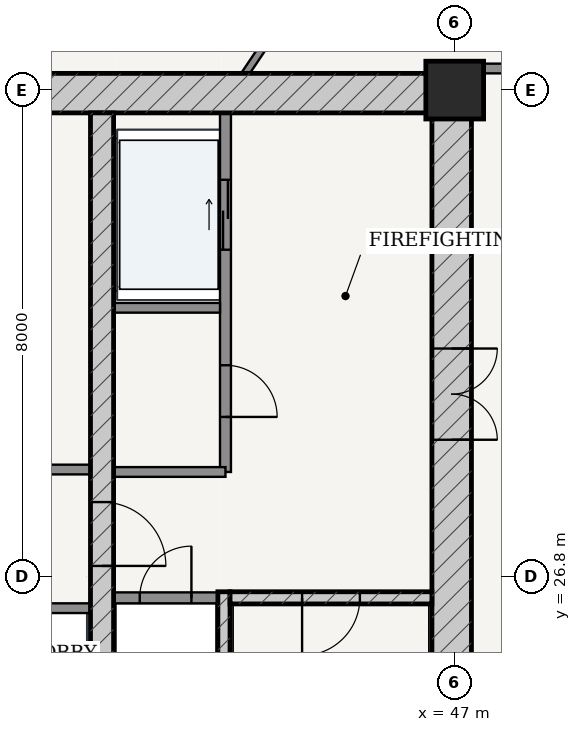
"""IFC4 building model, lengths in metres.
Left out: names, types, materials, properties, quantities, classifications, styles, units other than length and angle.
Written with IfcOpenShell. Run it as: python <this file> out.ifc"""

import sys

from ifc_helpers import new_model, si_unit, direction, frame, frame_2d, origin, origin_2d, place, context, subcontext, project, spatial, rectangle, extrude, source, transform, mapped, element, fill, save


model = new_model("IFC4")
c1 = context("Model", 3, precision=1e-05, world=origin(), true_north=direction((-0.2419218956, 0.970295726276)))
c2 = subcontext(c1, "Body", "Model", "MODEL_VIEW")
j1 = project(units=[si_unit("LENGTHUNIT", "METRE"), si_unit("PLANEANGLEUNIT", "RADIAN")], contexts=[c1])
p1 = place(None, origin())
s1 = spatial("IfcSite", under=j1, at=p1, CompositionType="ELEMENT")
p2 = place(p1, origin())
s2 = spatial("IfcBuilding", under=s1, at=p2, CompositionType="ELEMENT")
p3 = place(p2, frame((0.0, 0.0, 175.0)))
s3 = spatial("IfcBuildingStorey", under=s2, at=p3, CompositionType="ELEMENT", Elevation=175.0)
p4 = place(p3, frame((47.0, 34.8, 0.0), z_axis=(0.0, 0.0, 1.0), x_axis=(1.0, 0.0, 0.0)))
e1 = element("IfcColumn", 1, at=p4, inside=s3, PredefinedType="COLUMN", context=c2, shape_type="SweptSolid", body=[
    extrude(rectangle(XDim=0.95, YDim=0.95, at=origin_2d()), origin(), (0.0, 0.0, 1.0), 3.6),
])
p5 = place(p3, frame((28.725, 34.75, 0.0), z_axis=(0.0, 0.0, 1.0), x_axis=(1.0, 0.0, 0.0)))
e2 = element("IfcWall", 2, at=p5, inside=s3, PredefinedType="SHEAR", context=c2, shape_type="SweptSolid", body=[
    extrude(rectangle(XDim=18.55, YDim=0.65, at=frame_2d((9.275, 0.0))), origin(), (0.0, 0.0, 1.0), 3.33),
])
p6 = place(p3, frame((46.95, 19.175, 0.0), z_axis=(0.0, 0.0, 1.0), x_axis=(0.0, 1.0, 0.0)))
e3 = element("IfcWall", 3, at=p6, inside=s3, PredefinedType="SHEAR", context=c2, shape_type="SweptSolid", body=[
    extrude(rectangle(XDim=15.25, YDim=0.65, at=frame_2d((7.625, 0.0))), origin(), (0.0, 0.0, 1.0), 3.33),
])
p7 = place(p6, frame((9.875, 0.0, 0.0)))
e4 = element("IfcOpeningElement", 4, at=p7, cuts=e3, PredefinedType="OPENING", context=c2, shape_type="SweptSolid", body=[
    extrude(rectangle(XDim=1.5, YDim=2.2, at=frame_2d((0.75, 1.1))), frame((0.0, 0.335, 0.0), z_axis=(0.0, -1.0, 0.0), x_axis=(1.0, 0.0, 0.0)), (0.0, 0.0, 1.0), 0.67),
])
p8 = place(p3, frame((43.205, 19.175, 0.0), z_axis=(0.0, 0.0, 1.0), x_axis=(0.0, 1.0, 0.0)))
e5 = element("IfcWall", 5, at=p8, inside=s3, PredefinedType="SOLIDWALL", context=c2, shape_type="SweptSolid", body=[
    extrude(rectangle(XDim=7.375, YDim=0.2, at=frame_2d((3.688, 0.0))), origin(), (0.0, 0.0, 1.0), 3.33),
])
p9 = place(p3, frame((43.305, 26.45, 0.0), z_axis=(0.0, 0.0, 1.0), x_axis=(1.0, 0.0, 0.0)))
e6 = element("IfcWall", 6, at=p9, inside=s3, PredefinedType="SOLIDWALL", context=c2, shape_type="SweptSolid", body=[
    extrude(rectangle(XDim=3.32, YDim=0.2, at=frame_2d((1.66, 0.0))), origin(), (0.0, 0.0, 1.0), 3.33),
])
p10 = place(p9, frame((1.185, 0.0, 0.0)))
e7 = element("IfcOpeningElement", 7, at=p10, cuts=e6, PredefinedType="OPENING", context=c2, shape_type="SweptSolid", body=[
    extrude(rectangle(XDim=0.95, YDim=2.15, at=frame_2d((0.475, 1.075))), frame((0.0, 0.11, 0.0), z_axis=(0.0, -1.0, 0.0), x_axis=(1.0, 0.0, 0.0)), (0.0, 0.0, 1.0), 0.22),
])
p11 = place(p3, frame((41.2, 19.175, 0.0), z_axis=(0.0, 0.0, 1.0), x_axis=(0.0, 1.0, 0.0)))
e8 = element("IfcWall", 8, at=p11, inside=s3, PredefinedType="SHEAR", context=c2, shape_type="SweptSolid", body=[
    extrude(rectangle(XDim=15.25, YDim=0.38, at=frame_2d((7.625, 0.0))), origin(), (0.0, 0.0, 1.0), 3.33),
])
p12 = place(p11, frame((7.8, 0.0, 0.0)))
e9 = element("IfcOpeningElement", 9, at=p12, cuts=e8, PredefinedType="OPENING", context=c2, shape_type="SweptSolid", body=[
    extrude(rectangle(XDim=1.05, YDim=2.15, at=frame_2d((0.525, 1.075))), frame((0.0, 0.2, 0.0), z_axis=(0.0, -1.0, 0.0), x_axis=(1.0, 0.0, 0.0)), (0.0, 0.0, 1.0), 0.4),
])
p13 = place(p3, frame((41.39, 26.45, 0.0), z_axis=(0.0, 0.0, 1.0), x_axis=(1.0, 0.0, 0.0)))
e10 = element("IfcWall", 10, at=p13, inside=s3, PredefinedType="PARTITIONING", context=c2, shape_type="SweptSolid", body=[
    extrude(rectangle(XDim=1.71, YDim=0.18, at=frame_2d((0.855, 0.0))), origin(), (0.0, 0.0, 1.0), 3.33),
])
p14 = place(p13, frame((0.43, 0.0, 0.0)))
e11 = element("IfcOpeningElement", 11, at=p14, cuts=e10, PredefinedType="OPENING", context=c2, shape_type="SweptSolid", body=[
    extrude(rectangle(XDim=0.85, YDim=2.1, at=frame_2d((0.425, 1.05))), frame((0.0, 0.1, 0.0), z_axis=(0.0, -1.0, 0.0), x_axis=(1.0, 0.0, 0.0)), (0.0, 0.0, 1.0), 0.2),
])
p15 = place(p3, frame((43.23, 28.52, 0.0), z_axis=(0.0, 0.0, 1.0), x_axis=(0.0, 1.0, 0.0)))
e12 = element("IfcWall", 12, at=p15, inside=s3, PredefinedType="PARTITIONING", context=c2, shape_type="SweptSolid", body=[
    extrude(rectangle(XDim=5.905, YDim=0.18, at=frame_2d((2.953, 0.0))), origin(), (0.0, 0.0, 1.0), 3.33),
])
p16 = place(p15, frame((0.905, 0.0, 0.0)))
e13 = element("IfcOpeningElement", 13, at=p16, cuts=e12, PredefinedType="OPENING", context=c2, shape_type="SweptSolid", body=[
    extrude(rectangle(XDim=0.85, YDim=2.1, at=frame_2d((0.425, 1.05))), frame((0.0, 0.1, 0.0), z_axis=(0.0, -1.0, 0.0), x_axis=(1.0, 0.0, 0.0)), (0.0, 0.0, 1.0), 0.2),
])
p17 = place(p15, frame((3.655, 0.0, 0.0)))
e14 = element("IfcOpeningElement", 14, at=p17, cuts=e12, PredefinedType="OPENING", context=c2, shape_type="SweptSolid", body=[
    extrude(rectangle(XDim=1.15, YDim=2.2, at=frame_2d((0.575, 1.1))), frame((0.0, 0.1, 0.0), z_axis=(0.0, -1.0, 0.0), x_axis=(1.0, 0.0, 0.0)), (0.0, 0.0, 1.0), 0.2),
])
p18 = place(p3, frame((41.39, 31.22, 0.0), z_axis=(0.0, 0.0, 1.0), x_axis=(1.0, 0.0, 0.0)))
e15 = element("IfcWall", 15, at=p18, inside=s3, PredefinedType="PARTITIONING", context=c2, shape_type="SweptSolid", body=[
    extrude(rectangle(XDim=1.75, YDim=0.16, at=frame_2d((0.875, 0.0))), origin(), (0.0, 0.0, 1.0), 3.33),
])
p19 = place(p3, frame((41.39, 28.52, 0.0), z_axis=(0.0, 0.0, 1.0), x_axis=(1.0, 0.0, 0.0)))
e16 = element("IfcWall", 16, at=p19, inside=s3, PredefinedType="PARTITIONING", context=c2, shape_type="SweptSolid", body=[
    extrude(rectangle(XDim=1.84, YDim=0.16, at=frame_2d((0.92, 0.0))), origin(), (0.0, 0.0, 1.0), 3.33),
])
p20 = place(p3, frame((34.99, 28.56, 0.0), z_axis=(0.0, 0.0, 1.0), x_axis=(1.0, 0.0, 0.0)))
e17 = element("IfcWall", 17, at=p20, inside=s3, PredefinedType="PARTITIONING", context=c2, shape_type="SweptSolid", body=[
    extrude(rectangle(XDim=6.02, YDim=0.16, at=frame_2d((3.01, 0.0))), origin(), (0.0, 0.0, 1.0), 3.33),
])
p21 = place(p20, frame((1.025, 0.0, 0.0)))
e18 = element("IfcOpeningElement", 18, at=p21, cuts=e17, PredefinedType="OPENING", context=c2, shape_type="SweptSolid", body=[
    extrude(rectangle(XDim=0.86, YDim=2.1, at=frame_2d((0.43, 1.05))), frame((0.0, 0.09, 0.0), z_axis=(0.0, -1.0, 0.0), x_axis=(1.0, 0.0, 0.0)), (0.0, 0.0, 1.0), 0.18),
])
p22 = place(p20, frame((4.14, 0.0, 0.0)))
e19 = element("IfcOpeningElement", 19, at=p22, cuts=e17, PredefinedType="OPENING", context=c2, shape_type="SweptSolid", body=[
    extrude(rectangle(XDim=0.85, YDim=2.1, at=frame_2d((0.425, 1.05))), frame((0.0, 0.09, 0.0), z_axis=(0.0, -1.0, 0.0), x_axis=(1.0, 0.0, 0.0)), (0.0, 0.0, 1.0), 0.18),
])
p23 = place(p3, frame((34.99, 26.28, 0.0), z_axis=(0.0, 0.0, 1.0), x_axis=(1.0, 0.0, 0.0)))
e20 = element("IfcWall", 20, at=p23, inside=s3, PredefinedType="PARTITIONING", context=c2, shape_type="SweptSolid", body=[
    extrude(rectangle(XDim=6.02, YDim=0.16, at=frame_2d((3.01, 0.0))), origin(), (0.0, 0.0, 1.0), 3.33),
])
p24 = place(p23, frame((0.225, 0.0, 0.0)))
e21 = element("IfcOpeningElement", 21, at=p24, cuts=e20, PredefinedType="OPENING", context=c2, shape_type="SweptSolid", body=[
    extrude(rectangle(XDim=1.1, YDim=2.2, at=frame_2d((0.55, 1.1))), frame((0.0, 0.09, 0.0), z_axis=(0.0, -1.0, 0.0), x_axis=(1.0, 0.0, 0.0)), (0.0, 0.0, 1.0), 0.18),
])
p25 = place(p23, frame((1.705, 0.0, 0.0)))
e22 = element("IfcOpeningElement", 22, at=p25, cuts=e20, PredefinedType="OPENING", context=c2, shape_type="SweptSolid", body=[
    extrude(rectangle(XDim=1.1, YDim=2.2, at=frame_2d((0.55, 1.1))), frame((0.0, 0.09, 0.0), z_axis=(0.0, -1.0, 0.0), x_axis=(1.0, 0.0, 0.0)), (0.0, 0.0, 1.0), 0.18),
])
p26 = place(p3, frame((47.275, 35.155, 0.0), z_axis=(0.0, 0.0, 1.0), x_axis=(1.0, 0.0, 0.0)))
e23 = element("IfcWall", 23, at=p26, inside=s3, PredefinedType="PARTITIONING", context=c2, shape_type="SweptSolid", body=[
    extrude(rectangle(XDim=1.93, YDim=0.16, at=frame_2d((0.965, 0.0))), origin(), (0.0, 0.0, 1.0), 2.776),
])
p27 = place(p3, frame((43.559, 35.075, 0.0), z_axis=(0.0, 0.0, 1.0), x_axis=(0.557612855606, 0.830101140381, 0.0)))
e24 = element("IfcWall", 24, at=p27, inside=s3, PredefinedType="PARTITIONING", context=c2, shape_type="SweptSolid", body=[
    extrude(rectangle(XDim=3.323, YDim=0.12, at=frame_2d((1.662, 0.0))), origin(), (0.0, 0.0, 1.0), 3.33),
])
p28 = place(p27, frame((1.232, 0.0, 0.0)))
e25 = element("IfcOpeningElement", 25, at=p28, cuts=e24, PredefinedType="OPENING", context=c2, shape_type="SweptSolid", body=[
    extrude(rectangle(XDim=0.86, YDim=2.15, at=frame_2d((0.43, 1.075))), frame((0.0, 0.07, 0.0), z_axis=(0.0, -1.0, 0.0), x_axis=(1.0, 0.0, 0.0)), (0.0, 0.0, 1.0), 0.14),
])
m1 = source(origin(), c2, "Body", "SweptSolid", [
    extrude(rectangle(XDim=1.5, YDim=2.2, at=frame_2d((0.75, 1.1))), frame((0.0, 0.025, 0.0), z_axis=(0.0, -1.0, 0.0), x_axis=(1.0, 0.0, 0.0)), (0.0, 0.0, 1.0), 0.05),
])
p29 = place(p7, frame((1.5, 0.0, 0.0), z_axis=(0.0, 0.0, 1.0), x_axis=(-1.0, 0.0, 0.0)))
e26 = element("IfcDoor", 26, at=p29, inside=s3, OperationType="DOUBLE_DOOR_SINGLE_SWING", PredefinedType="DOOR", context=c2, shape_type="MappedRepresentation", body=[
    mapped(m1, transform((0.0, 0.0, 0.0), scale=1.0)),
])
fill(e4, e26)
m2 = source(origin(), c2, "Body", "SweptSolid", [
    extrude(rectangle(XDim=1.05, YDim=2.15, at=frame_2d((0.525, 1.075))), frame((0.0, 0.025, 0.0), z_axis=(0.0, -1.0, 0.0), x_axis=(1.0, 0.0, 0.0)), (0.0, 0.0, 1.0), 0.05),
])
p30 = place(p12, frame((1.05, 0.0, 0.0), z_axis=(0.0, 0.0, 1.0), x_axis=(-1.0, 0.0, 0.0)))
e27 = element("IfcDoor", 27, at=p30, inside=s3, OperationType="SINGLE_SWING_RIGHT", PredefinedType="DOOR", context=c2, shape_type="MappedRepresentation", body=[
    mapped(m2, transform((0.0, 0.0, 0.0), scale=1.0)),
])
fill(e9, e27)
m3 = source(origin(), c2, "Body", "SweptSolid", [
    extrude(rectangle(XDim=0.95, YDim=2.15, at=frame_2d((0.475, 1.075))), frame((0.0, 0.025, 0.0), z_axis=(0.0, -1.0, 0.0), x_axis=(1.0, 0.0, 0.0)), (0.0, 0.0, 1.0), 0.05),
])
p31 = place(p10, frame((0.95, 0.0, 0.0), z_axis=(0.0, 0.0, 1.0), x_axis=(-1.0, 0.0, 0.0)))
e28 = element("IfcDoor", 28, at=p31, inside=s3, OperationType="SINGLE_SWING_RIGHT", PredefinedType="DOOR", context=c2, shape_type="MappedRepresentation", body=[
    mapped(m3, transform((0.0, 0.0, 0.0), scale=1.0)),
])
fill(e7, e28)
m4 = source(origin(), c2, "Body", "SweptSolid", [
    extrude(rectangle(XDim=0.85, YDim=2.1, at=frame_2d((0.425, 1.05))), frame((0.0, 0.025, 0.0), z_axis=(0.0, -1.0, 0.0), x_axis=(1.0, 0.0, 0.0)), (0.0, 0.0, 1.0), 0.05),
])
p32 = place(p14, origin())
e29 = element("IfcDoor", 29, at=p32, inside=s3, OperationType="SINGLE_SWING_RIGHT", PredefinedType="DOOR", context=c2, shape_type="MappedRepresentation", body=[
    mapped(m4, transform((0.0, 0.0, 0.0), scale=1.0)),
])
fill(e11, e29)
p33 = place(p16, frame((0.85, 0.0, 0.0), z_axis=(0.0, 0.0, 1.0), x_axis=(-1.0, 0.0, 0.0)))
e30 = element("IfcDoor", 30, at=p33, inside=s3, OperationType="SINGLE_SWING_RIGHT", PredefinedType="DOOR", context=c2, shape_type="MappedRepresentation", body=[
    mapped(m4, transform((0.0, 0.0, 0.0), scale=1.0)),
])
fill(e13, e30)
m5 = source(origin(), c2, "Body", "SweptSolid", [
    extrude(rectangle(XDim=1.15, YDim=2.2, at=frame_2d((0.575, 1.1))), frame((0.0, 0.025, 0.0), z_axis=(0.0, -1.0, 0.0), x_axis=(1.0, 0.0, 0.0)), (0.0, 0.0, 1.0), 0.05),
])
p34 = place(p17, origin())
e31 = element("IfcDoor", 31, at=p34, inside=s3, OperationType="DOUBLE_DOOR_SLIDING", PredefinedType="DOOR", context=c2, shape_type="MappedRepresentation", body=[
    mapped(m5, transform((0.0, 0.0, 0.0), scale=1.0)),
])
fill(e14, e31)
save(model, sys.argv[1])
